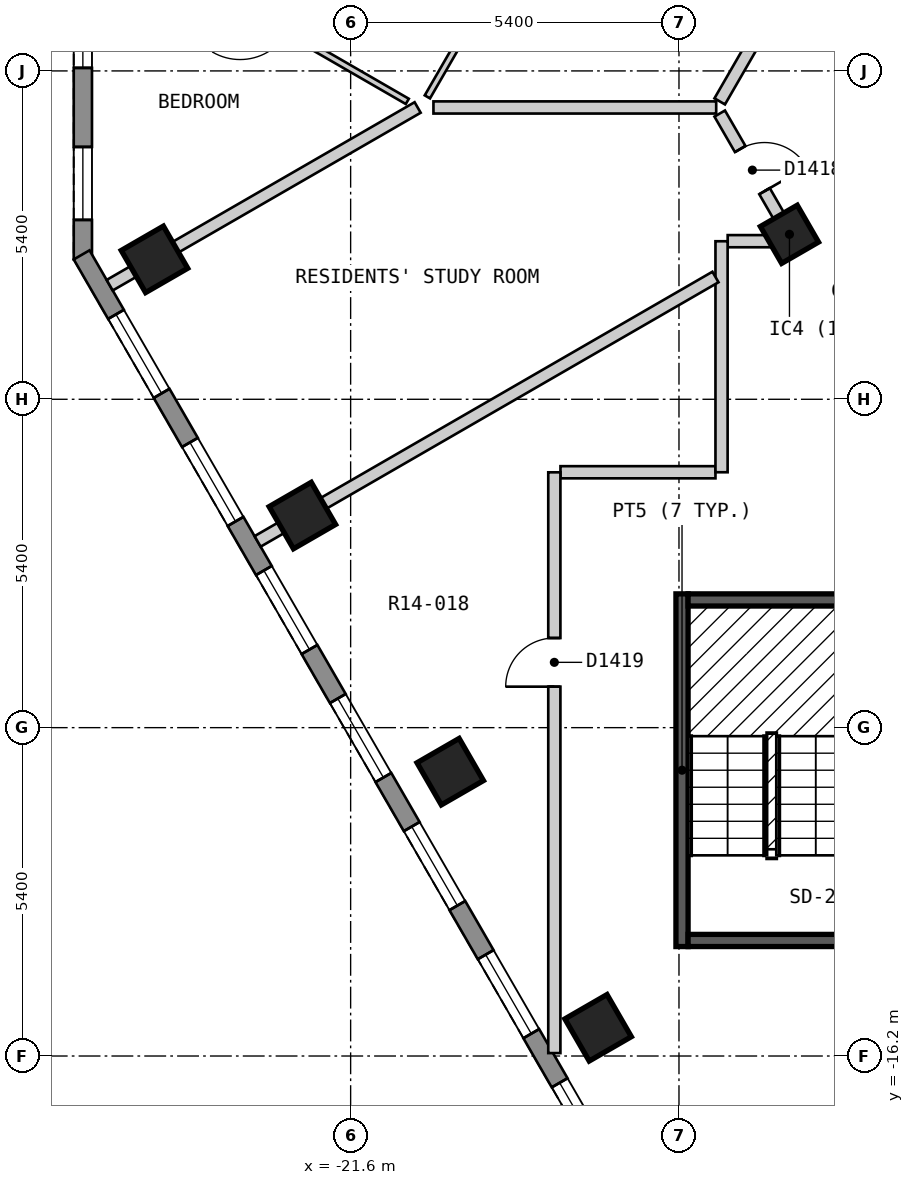
"""IFC4 building model, lengths in metres.
Left out: names, types, materials, properties, quantities, classifications, styles, units other than length and angle.
Written with IfcOpenShell. Run it as: python <this file> out.ifc"""

import sys

from ifc_helpers import new_model, si_unit, direction, frame, frame_2d, origin, origin_2d, place, context, subcontext, project, spatial, polyline, rectangle, outline, extrude, element, fill, save


model = new_model("IFC4")
c1 = context("Model", 3, precision=1e-05, world=origin(), true_north=direction((0.0, 1.0)))
c2 = subcontext(c1, "Body", "Model", "MODEL_VIEW")
j1 = project(units=[si_unit("LENGTHUNIT", "METRE"), si_unit("PLANEANGLEUNIT", "RADIAN")], contexts=[c1])
p1 = place(None, origin())
s1 = spatial("IfcSite", under=j1, at=p1, CompositionType="ELEMENT")
p2 = place(p1, origin())
s2 = spatial("IfcBuilding", under=s1, at=p2, CompositionType="ELEMENT")
p3 = place(p2, frame((0.0, 0.0, 172.2)))
s3 = spatial("IfcBuildingStorey", under=s2, at=p3, CompositionType="ELEMENT", Elevation=172.2)
for number, where, z_axis, x_axis in (
    (1, (-24.826, -3.099, 0.0), (0.0, 0.0, 1.0), (0.5, -0.866, 0.0)),
    (2, (-22.394, -7.312, 0.0), (0.0, 0.0, 1.0), (0.5, -0.866, 0.0)),
    (3, (-19.962, -11.524, 0.0), (0.0, 0.0, 1.0), (0.5, -0.866, 0.0)),
    (4, (-17.53, -15.736, 0.0), (0.0, 0.0, 1.0), (0.5, -0.866, 0.0)),
):
    element("IfcColumn", number, at=place(p3, frame(where, z_axis=z_axis, x_axis=x_axis)), inside=s3, PredefinedType="COLUMN", context=c2, shape_type="SweptSolid", body=[
        extrude(rectangle(XDim=0.8, YDim=0.8, at=origin_2d()), origin(), (0.0, 0.0, 1.0), 3.0),
    ])
p4 = place(p3, frame((-14.383, -2.687, 0.0), z_axis=(0.0, 0.0, 1.0), x_axis=(0.5, -0.866025403784, 0.0)))
e5 = element("IfcColumn", 5, at=p4, inside=s3, PredefinedType="COLUMN", context=c2, shape_type="SweptSolid", body=[
    extrude(rectangle(XDim=0.7, YDim=0.7, at=origin_2d()), origin(), (0.0, 0.0, 1.0), 3.0),
])
p5 = place(p3, frame((-26.004, 1.9, 0.0), z_axis=(0.0, 0.0, 1.0), x_axis=(0.0, -1.0, 0.0)))
e6 = element("IfcWall", 6, at=p5, inside=s3, PredefinedType="SOLIDWALL", context=c2, shape_type="SweptSolid", body=[
    extrude(outline(polyline([(0.0, -0.15), (5.0, -0.15), (4.92, 0.15), (0.08, 0.15), (0.0, -0.15)])), origin(), (0.0, 0.0, 1.0), 2.7),
])
p6 = place(p5, frame((0.65, 0.0, 0.15)))
e7 = element("IfcOpeningElement", 7, at=p6, cuts=e6, PredefinedType="OPENING", context=c2, shape_type="SweptSolid", body=[
    extrude(rectangle(XDim=1.2, YDim=2.1, at=frame_2d((0.6, 1.05))), frame((0.0, 0.16, 0.0), z_axis=(0.0, -1.0, 0.0), x_axis=(1.0, 0.0, 0.0)), (0.0, 0.0, 1.0), 0.32),
])
p7 = place(p5, frame((3.15, 0.0, 0.15)))
e8 = element("IfcOpeningElement", 8, at=p7, cuts=e6, PredefinedType="OPENING", context=c2, shape_type="SweptSolid", body=[
    extrude(rectangle(XDim=1.2, YDim=2.1, at=frame_2d((0.6, 1.05))), frame((0.0, 0.16, 0.0), z_axis=(0.0, -1.0, 0.0), x_axis=(1.0, 0.0, 0.0)), (0.0, 0.0, 1.0), 0.32),
])
p8 = place(p3, frame((-26.024, -3.025, 0.0), z_axis=(0.0, 0.0, 1.0), x_axis=(0.500018670445, -0.86601462413, 0.0)))
e9 = element("IfcWall", 9, at=p8, inside=s3, PredefinedType="SOLIDWALL", context=c2, shape_type="SweptSolid", body=[
    extrude(outline(polyline([(0.0, -0.15), (20.785, -0.15), (20.705, 0.15), (0.08, 0.15), (0.0, -0.15)])), origin(), (0.0, 0.0, 1.0), 2.7),
])
p9 = place(p8, frame((1.13, 0.0, 0.15)))
e10 = element("IfcOpeningElement", 10, at=p9, cuts=e9, PredefinedType="OPENING", context=c2, shape_type="SweptSolid", body=[
    extrude(rectangle(XDim=1.5, YDim=2.1, at=frame_2d((0.75, 1.05))), frame((0.0, 0.16, 0.0), z_axis=(0.0, -1.0, 0.0), x_axis=(1.0, 0.0, 0.0)), (0.0, 0.0, 1.0), 0.32),
])
p10 = place(p8, frame((3.562, 0.0, 0.15)))
e11 = element("IfcOpeningElement", 11, at=p10, cuts=e9, PredefinedType="OPENING", context=c2, shape_type="SweptSolid", body=[
    extrude(rectangle(XDim=1.5, YDim=2.1, at=frame_2d((0.75, 1.05))), frame((0.0, 0.16, 0.0), z_axis=(0.0, -1.0, 0.0), x_axis=(1.0, 0.0, 0.0)), (0.0, 0.0, 1.0), 0.32),
])
p11 = place(p8, frame((5.994, 0.0, 0.15)))
e12 = element("IfcOpeningElement", 12, at=p11, cuts=e9, PredefinedType="OPENING", context=c2, shape_type="SweptSolid", body=[
    extrude(rectangle(XDim=1.5, YDim=2.1, at=frame_2d((0.75, 1.05))), frame((0.0, 0.16, 0.0), z_axis=(0.0, -1.0, 0.0), x_axis=(1.0, 0.0, 0.0)), (0.0, 0.0, 1.0), 0.32),
])
p12 = place(p8, frame((8.425, 0.0, 0.15)))
e13 = element("IfcOpeningElement", 13, at=p12, cuts=e9, PredefinedType="OPENING", context=c2, shape_type="SweptSolid", body=[
    extrude(rectangle(XDim=1.5, YDim=2.1, at=frame_2d((0.75, 1.05))), frame((0.0, 0.16, 0.0), z_axis=(0.0, -1.0, 0.0), x_axis=(1.0, 0.0, 0.0)), (0.0, 0.0, 1.0), 0.32),
])
p13 = place(p8, frame((10.857, 0.0, 0.15)))
e14 = element("IfcOpeningElement", 14, at=p13, cuts=e9, PredefinedType="OPENING", context=c2, shape_type="SweptSolid", body=[
    extrude(rectangle(XDim=1.5, YDim=2.1, at=frame_2d((0.75, 1.05))), frame((0.0, 0.16, 0.0), z_axis=(0.0, -1.0, 0.0), x_axis=(1.0, 0.0, 0.0)), (0.0, 0.0, 1.0), 0.32),
])
p14 = place(p8, frame((13.289, 0.0, 0.15)))
e15 = element("IfcOpeningElement", 15, at=p14, cuts=e9, PredefinedType="OPENING", context=c2, shape_type="SweptSolid", body=[
    extrude(rectangle(XDim=1.5, YDim=2.1, at=frame_2d((0.75, 1.05))), frame((0.0, 0.16, 0.0), z_axis=(0.0, -1.0, 0.0), x_axis=(1.0, 0.0, 0.0)), (0.0, 0.0, 1.0), 0.32),
])
p15 = place(p8, frame((15.722, 0.0, 0.15)))
e16 = element("IfcOpeningElement", 16, at=p15, cuts=e9, PredefinedType="OPENING", context=c2, shape_type="SweptSolid", body=[
    extrude(rectangle(XDim=1.5, YDim=2.1, at=frame_2d((0.75, 1.05))), frame((0.0, 0.16, 0.0), z_axis=(0.0, -1.0, 0.0), x_axis=(1.0, 0.0, 0.0)), (0.0, 0.0, 1.0), 0.32),
])
p16 = place(p8, frame((18.154, 0.0, 0.15)))
e17 = element("IfcOpeningElement", 17, at=p16, cuts=e9, PredefinedType="OPENING", context=c2, shape_type="SweptSolid", body=[
    extrude(rectangle(XDim=1.5, YDim=2.1, at=frame_2d((0.75, 1.05))), frame((0.0, 0.16, 0.0), z_axis=(0.0, -1.0, 0.0), x_axis=(1.0, 0.0, 0.0)), (0.0, 0.0, 1.0), 0.32),
])
p17 = place(p3, frame((-15.53, -0.701, 0.0), z_axis=(0.0, 0.0, 1.0), x_axis=(0.499972710878, -0.866041158593, 0.0)))
e18 = element("IfcWall", 18, at=p17, inside=s3, PredefinedType="PARTITIONING", context=c2, shape_type="SweptSolid", body=[
    extrude(rectangle(XDim=2.308, YDim=0.2, at=frame_2d((1.154, 0.0))), origin(), (0.0, 0.0, 1.0), 2.7),
])
p18 = place(p17, frame((0.674, 0.0, 0.0)))
e19 = element("IfcOpeningElement", 19, at=p18, cuts=e18, PredefinedType="OPENING", context=c2, shape_type="SweptSolid", body=[
    extrude(rectangle(XDim=0.8, YDim=2.1, at=frame_2d((0.4, 1.05))), frame((0.0, 0.11, 0.0), z_axis=(0.0, -1.0, 0.0), x_axis=(1.0, 0.0, 0.0)), (0.0, 0.0, 1.0), 0.22),
])
p19 = place(p3, frame((-18.149, -6.6, 0.0), z_axis=(0.0, 0.0, 1.0), x_axis=(1.0, 0.0, 0.0)))
e20 = element("IfcWall", 20, at=p19, inside=s3, PredefinedType="PARTITIONING", context=c2, shape_type="SweptSolid", body=[
    extrude(rectangle(XDim=2.549, YDim=0.2, at=frame_2d((1.274, 0.0))), origin(), (0.0, 0.0, 1.0), 2.7),
])
p20 = place(p3, frame((-15.399, -2.8, 0.0), z_axis=(0.0, 0.0, 1.0), x_axis=(1.0, 0.0, 0.0)))
e21 = element("IfcWall", 21, at=p20, inside=s3, PredefinedType="PARTITIONING", context=c2, shape_type="SweptSolid", body=[
    extrude(rectangle(XDim=1.081, YDim=0.2, at=frame_2d((0.541, 0.0))), origin(), (0.0, 0.0, 1.0), 2.7),
])
p21 = place(p3, frame((-15.53, -0.501, 0.0), z_axis=(0.0, 0.0, 1.0), x_axis=(0.499952498232, 0.866052827206, 0.0)))
e22 = element("IfcWall", 22, at=p21, inside=s3, PredefinedType="PARTITIONING", context=c2, shape_type="SweptSolid", body=[
    extrude(rectangle(XDim=9.585, YDim=0.2, at=frame_2d((4.792, 0.0))), origin(), (0.0, 0.0, 1.0), 2.7),
])
p22 = place(p3, frame((-15.5, -6.6, 0.0), z_axis=(0.0, 0.0, 1.0), x_axis=(0.0, 1.0, 0.0)))
e23 = element("IfcWall", 23, at=p22, inside=s3, PredefinedType="PARTITIONING", context=c2, shape_type="SweptSolid", body=[
    extrude(rectangle(XDim=3.799, YDim=0.2, at=frame_2d((1.899, 0.0))), origin(), (0.0, 0.0, 1.0), 2.7),
])
p23 = place(p3, frame((-18.25, -16.152, 0.0), z_axis=(0.0, 0.0, 1.0), x_axis=(0.0, 1.0, 0.0)))
e24 = element("IfcWall", 24, at=p23, inside=s3, PredefinedType="PARTITIONING", context=c2, shape_type="SweptSolid", body=[
    extrude(rectangle(XDim=9.551, YDim=0.2, at=frame_2d((4.775, 0.0))), origin(), (0.0, 0.0, 1.0), 2.7),
])
p24 = place(p23, frame((6.026, 0.0, 0.0)))
e25 = element("IfcOpeningElement", 25, at=p24, cuts=e24, PredefinedType="OPENING", context=c2, shape_type="SweptSolid", body=[
    extrude(rectangle(XDim=0.8, YDim=2.1, at=frame_2d((0.4, 1.05))), frame((0.0, 0.11, 0.0), z_axis=(0.0, -1.0, 0.0), x_axis=(1.0, 0.0, 0.0)), (0.0, 0.0, 1.0), 0.22),
])
p25 = place(p3, frame((-25.562, 2.325, 0.0), z_axis=(0.0, 0.0, 1.0), x_axis=(0.865998530728, -0.500046542611, 0.0)))
e26 = element("IfcWall", 26, at=p25, inside=s3, PredefinedType="PARTITIONING", context=c2, shape_type="SweptSolid", body=[
    extrude(rectangle(XDim=5.651, YDim=0.1, at=frame_2d((2.826, 0.0))), origin(), (0.0, 0.0, 1.0), 2.7),
])
p26 = place(p25, frame((2.476, 0.0, 0.0)))
e27 = element("IfcOpeningElement", 27, at=p26, cuts=e26, PredefinedType="OPENING", context=c2, shape_type="SweptSolid", body=[
    extrude(rectangle(XDim=0.9, YDim=2.1, at=frame_2d((0.45, 1.05))), frame((0.0, 0.06, 0.0), z_axis=(0.0, -1.0, 0.0), x_axis=(1.0, 0.0, 0.0)), (0.0, 0.0, 1.0), 0.12),
])
p27 = place(p3, frame((-20.338, -0.427, 0.0), z_axis=(0.0, 0.0, 1.0), x_axis=(0.500069990121, 0.865984991198, 0.0)))
e28 = element("IfcWall", 28, at=p27, inside=s3, PredefinedType="PARTITIONING", context=c2, shape_type="SweptSolid", body=[
    extrude(rectangle(XDim=1.176, YDim=0.1, at=frame_2d((0.588, 0.0))), origin(), (0.0, 0.0, 1.0), 2.7),
])
p28 = place(p3, frame((-20.238, -0.601, 0.0), z_axis=(0.0, 0.0, 1.0), x_axis=(1.0, 0.0, 0.0)))
e29 = element("IfcWall", 29, at=p28, inside=s3, PredefinedType="PARTITIONING", context=c2, shape_type="SweptSolid", body=[
    extrude(rectangle(XDim=4.65, YDim=0.2, at=frame_2d((2.325, 0.0))), origin(), (0.0, 0.0, 1.0), 2.7),
])
p29 = place(p3, frame((-23.13, -7.737, 0.0), z_axis=(0.0, 0.0, 1.0), x_axis=(0.86598451299, 0.500070818246, 0.0)))
e30 = element("IfcWall", 30, at=p29, inside=s3, PredefinedType="PARTITIONING", context=c2, shape_type="SweptSolid", body=[
    extrude(rectangle(XDim=8.695, YDim=0.2, at=frame_2d((4.348, 0.0))), origin(), (0.0, 0.0, 1.0), 2.7),
])
p30 = place(p3, frame((-25.563, -3.524, 0.0), z_axis=(0.0, 0.0, 1.0), x_axis=(0.866128586522, 0.499821239653, 0.0)))
e31 = element("IfcWall", 31, at=p30, inside=s3, PredefinedType="PARTITIONING", context=c2, shape_type="SweptSolid", body=[
    extrude(rectangle(XDim=5.848, YDim=0.2, at=frame_2d((2.924, 0.0))), origin(), (0.0, 0.0, 1.0), 2.7),
])
p31 = place(p3, frame((-16.15, -14.4, 0.0), z_axis=(0.0, 0.0, 1.0), x_axis=(0.0, 1.0, 0.0)))
e32 = element("IfcWall", 32, at=p31, inside=s3, PredefinedType="SOLIDWALL", context=c2, shape_type="SweptSolid", body=[
    extrude(rectangle(XDim=5.8, YDim=0.2, at=frame_2d((2.9, 0.0))), origin(), (0.0, 0.0, 1.0), 2.7),
])
for number, where, z_axis, x_axis in (
    (33, (-16.05, -14.3, 0.0), (0.0, 0.0, 1.0), (1.0, 0.0, 0.0)),
    (34, (-16.05, -8.7, 0.0), (0.0, 0.0, 1.0), (1.0, 0.0, 0.0)),
):
    element("IfcWall", number, at=place(p3, frame(where, z_axis=z_axis, x_axis=x_axis)), inside=s3, PredefinedType="SOLIDWALL", context=c2, shape_type="SweptSolid", body=[
        extrude(rectangle(XDim=2.75, YDim=0.2, at=frame_2d((1.375, 0.0))), origin(), (0.0, 0.0, 1.0), 2.7),
    ])
p32 = place(p6, origin())
e35 = element("IfcWindow", 35, at=p32, inside=s3, PartitioningType="SINGLE_PANEL", PredefinedType="WINDOW", context=c2, shape_type="SweptSolid", body=[
    extrude(rectangle(XDim=1.2, YDim=2.1, at=frame_2d((0.6, 1.05))), frame((0.0, 0.03, 0.0), z_axis=(0.0, -1.0, 0.0), x_axis=(1.0, 0.0, 0.0)), (0.0, 0.0, 1.0), 0.06),
])
fill(e7, e35)
p33 = place(p7, origin())
e36 = element("IfcWindow", 36, at=p33, inside=s3, PartitioningType="SINGLE_PANEL", PredefinedType="WINDOW", context=c2, shape_type="SweptSolid", body=[
    extrude(rectangle(XDim=1.2, YDim=2.1, at=frame_2d((0.6, 1.05))), frame((0.0, 0.03, 0.0), z_axis=(0.0, -1.0, 0.0), x_axis=(1.0, 0.0, 0.0)), (0.0, 0.0, 1.0), 0.06),
])
fill(e8, e36)
p34 = place(p9, origin())
e37 = element("IfcWindow", 37, at=p34, inside=s3, PartitioningType="SINGLE_PANEL", PredefinedType="WINDOW", context=c2, shape_type="SweptSolid", body=[
    extrude(rectangle(XDim=1.5, YDim=2.1, at=frame_2d((0.75, 1.05))), frame((0.0, 0.03, 0.0), z_axis=(0.0, -1.0, 0.0), x_axis=(1.0, 0.0, 0.0)), (0.0, 0.0, 1.0), 0.06),
])
fill(e10, e37)
p35 = place(p10, origin())
e38 = element("IfcWindow", 38, at=p35, inside=s3, PartitioningType="SINGLE_PANEL", PredefinedType="WINDOW", context=c2, shape_type="SweptSolid", body=[
    extrude(rectangle(XDim=1.5, YDim=2.1, at=frame_2d((0.75, 1.05))), frame((0.0, 0.03, 0.0), z_axis=(0.0, -1.0, 0.0), x_axis=(1.0, 0.0, 0.0)), (0.0, 0.0, 1.0), 0.06),
])
fill(e11, e38)
p36 = place(p11, origin())
e39 = element("IfcWindow", 39, at=p36, inside=s3, PartitioningType="SINGLE_PANEL", PredefinedType="WINDOW", context=c2, shape_type="SweptSolid", body=[
    extrude(rectangle(XDim=1.5, YDim=2.1, at=frame_2d((0.75, 1.05))), frame((0.0, 0.03, 0.0), z_axis=(0.0, -1.0, 0.0), x_axis=(1.0, 0.0, 0.0)), (0.0, 0.0, 1.0), 0.06),
])
fill(e12, e39)
p37 = place(p12, origin())
e40 = element("IfcWindow", 40, at=p37, inside=s3, PartitioningType="SINGLE_PANEL", PredefinedType="WINDOW", context=c2, shape_type="SweptSolid", body=[
    extrude(rectangle(XDim=1.5, YDim=2.1, at=frame_2d((0.75, 1.05))), frame((0.0, 0.03, 0.0), z_axis=(0.0, -1.0, 0.0), x_axis=(1.0, 0.0, 0.0)), (0.0, 0.0, 1.0), 0.06),
])
fill(e13, e40)
p38 = place(p13, origin())
e41 = element("IfcWindow", 41, at=p38, inside=s3, PartitioningType="SINGLE_PANEL", PredefinedType="WINDOW", context=c2, shape_type="SweptSolid", body=[
    extrude(rectangle(XDim=1.5, YDim=2.1, at=frame_2d((0.75, 1.05))), frame((0.0, 0.03, 0.0), z_axis=(0.0, -1.0, 0.0), x_axis=(1.0, 0.0, 0.0)), (0.0, 0.0, 1.0), 0.06),
])
fill(e14, e41)
p39 = place(p14, origin())
e42 = element("IfcWindow", 42, at=p39, inside=s3, PartitioningType="SINGLE_PANEL", PredefinedType="WINDOW", context=c2, shape_type="SweptSolid", body=[
    extrude(rectangle(XDim=1.5, YDim=2.1, at=frame_2d((0.75, 1.05))), frame((0.0, 0.03, 0.0), z_axis=(0.0, -1.0, 0.0), x_axis=(1.0, 0.0, 0.0)), (0.0, 0.0, 1.0), 0.06),
])
fill(e15, e42)
p40 = place(p15, origin())
e43 = element("IfcWindow", 43, at=p40, inside=s3, PartitioningType="SINGLE_PANEL", PredefinedType="WINDOW", context=c2, shape_type="SweptSolid", body=[
    extrude(rectangle(XDim=1.5, YDim=2.1, at=frame_2d((0.75, 1.05))), frame((0.0, 0.03, 0.0), z_axis=(0.0, -1.0, 0.0), x_axis=(1.0, 0.0, 0.0)), (0.0, 0.0, 1.0), 0.06),
])
fill(e16, e43)
p41 = place(p18, origin())
e44 = element("IfcDoor", 44, at=p41, inside=s3, OperationType="SINGLE_SWING_RIGHT", PredefinedType="DOOR", context=c2, shape_type="SweptSolid", body=[
    extrude(rectangle(XDim=0.8, YDim=2.1, at=frame_2d((0.4, 1.05))), frame((0.0, 0.025, 0.0), z_axis=(0.0, -1.0, 0.0), x_axis=(1.0, 0.0, 0.0)), (0.0, 0.0, 1.0), 0.05),
])
fill(e19, e44)
p42 = place(p24, origin())
e45 = element("IfcDoor", 45, at=p42, inside=s3, OperationType="SINGLE_SWING_LEFT", PredefinedType="DOOR", context=c2, shape_type="SweptSolid", body=[
    extrude(rectangle(XDim=0.8, YDim=2.1, at=frame_2d((0.4, 1.05))), frame((0.0, 0.025, 0.0), z_axis=(0.0, -1.0, 0.0), x_axis=(1.0, 0.0, 0.0)), (0.0, 0.0, 1.0), 0.05),
])
fill(e25, e45)
save(model, sys.argv[1])
